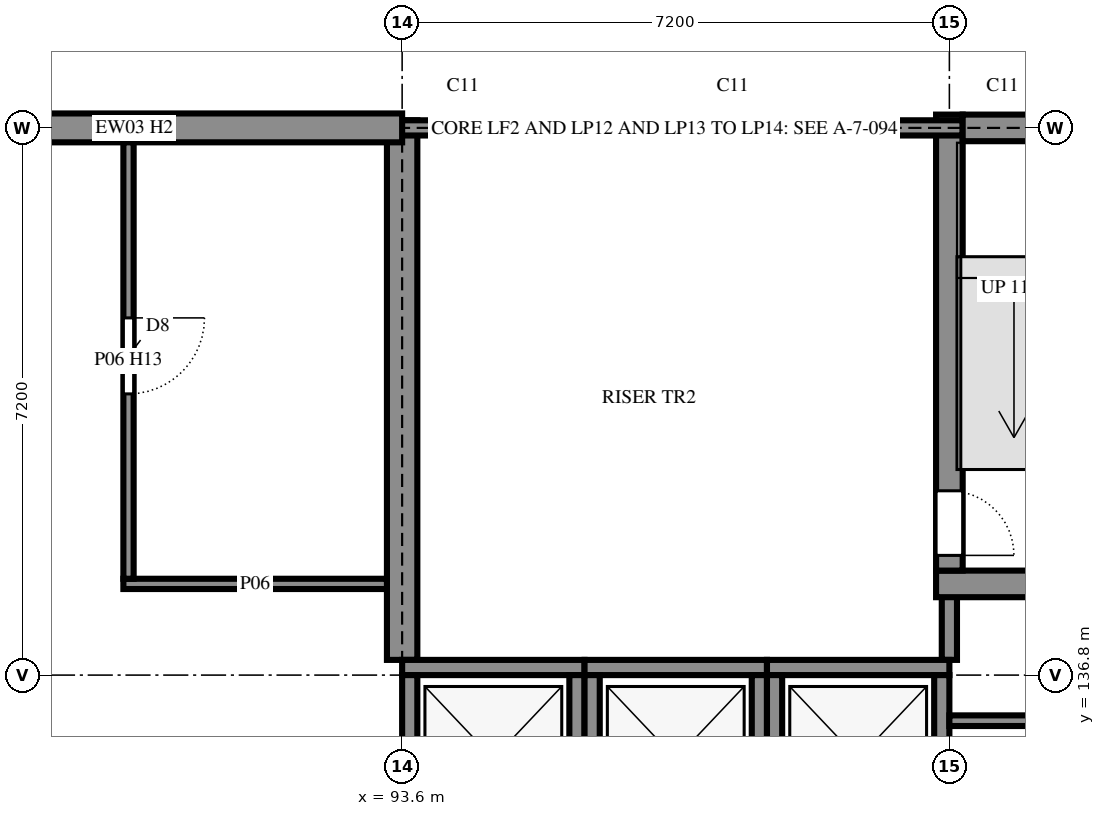
"""IFC4 building model, lengths in metres.
Left out: names, types, materials, properties, quantities, classifications, styles, units other than length and angle.
Written with IfcOpenShell. Run it as: python <this file> out.ifc"""

import sys

from ifc_helpers import new_model, si_unit, direction, frame, frame_2d, origin, origin_2d, place, context, subcontext, project, spatial, rectangle, i_section, extrude, element, fill, save


model = new_model("IFC4")
c1 = context("Model", 3, precision=1e-05, world=origin(), true_north=direction((0.0, 1.0)))
c2 = subcontext(c1, "Body", "Model", "MODEL_VIEW")
j1 = project(units=[si_unit("LENGTHUNIT", "METRE"), si_unit("PLANEANGLEUNIT", "RADIAN")], contexts=[c1])
p1 = place(None, origin())
s1 = spatial("IfcSite", under=j1, at=p1, CompositionType="ELEMENT")
p2 = place(p1, origin())
s2 = spatial("IfcBuilding", under=s1, at=p2, CompositionType="ELEMENT")
p3 = place(p2, frame((0.0, 0.0, 7.2)))
s3 = spatial("IfcBuildingStorey", under=s2, at=p3, CompositionType="ELEMENT", Elevation=7.2)
p4 = place(p3, frame((100.8, 137.0, 0.0), z_axis=(0.0, 0.0, 1.0), x_axis=(0.0, 1.0, 0.0)))
e1 = element("IfcWall", 1, at=p4, inside=s3, PredefinedType="SHEAR", context=c2, shape_type="SweptSolid", body=[
    extrude(rectangle(XDim=1.175, YDim=0.2, at=frame_2d((0.587, 0.0))), origin(), (0.0, 0.0, 1.0), 3.6),
])
p5 = place(p3, frame((100.625, 138.0, 0.0), z_axis=(0.0, 0.0, 1.0), x_axis=(1.0, 0.0, 0.0)))
e2 = element("IfcWall", 2, at=p5, inside=s3, PredefinedType="SHEAR", context=c2, shape_type="SweptSolid", body=[
    extrude(rectangle(XDim=3.75, YDim=0.35, at=frame_2d((1.875, 0.0))), origin(), (0.0, 0.0, 1.0), 3.6),
])
p6 = place(p5, frame((1.375, 0.0, 0.0)))
e3 = element("IfcOpeningElement", 3, at=p6, cuts=e2, PredefinedType="OPENING", context=c2, shape_type="SweptSolid", body=[
    extrude(rectangle(XDim=1.0, YDim=2.1, at=frame_2d((0.5, 1.05))), frame((0.0, 0.185, 0.0), z_axis=(0.0, -1.0, 0.0), x_axis=(1.0, 0.0, 0.0)), (0.0, 0.0, 1.0), 0.37),
])
p7 = place(p3, frame((93.6, 144.1, 0.0), z_axis=(0.0, 0.0, 1.0), x_axis=(0.0, -1.0, 0.0)))
e4 = element("IfcWall", 4, at=p7, inside=s3, PredefinedType="SHEAR", context=c2, shape_type="SweptSolid", body=[
    extrude(rectangle(XDim=7.1, YDim=0.4, at=frame_2d((3.55, 0.0))), origin(), (0.0, 0.0, 1.0), 3.6),
])
p8 = place(p3, frame((100.8, 144.175, 0.0), z_axis=(0.0, 0.0, 1.0), x_axis=(0.0, -1.0, 0.0)))
e5 = element("IfcWall", 5, at=p8, inside=s3, PredefinedType="SHEAR", context=c2, shape_type="SweptSolid", body=[
    extrude(rectangle(XDim=6.0, YDim=0.35, at=frame_2d((3.0, 0.0))), origin(), (0.0, 0.0, 1.0), 3.6),
])
p9 = place(p8, frame((4.95, 0.0, 0.0)))
e6 = element("IfcOpeningElement", 6, at=p9, cuts=e5, PredefinedType="OPENING", context=c2, shape_type="SweptSolid", body=[
    extrude(rectangle(XDim=0.85, YDim=2.1, at=frame_2d((0.425, 1.05))), frame((0.0, 0.185, 0.0), z_axis=(0.0, -1.0, 0.0), x_axis=(1.0, 0.0, 0.0)), (0.0, 0.0, 1.0), 0.37),
])
p10 = place(p3, frame((100.975, 144.0, 0.0), z_axis=(0.0, 0.0, 1.0), x_axis=(-1.0, 0.0, 0.0)))
e7 = element("IfcWall", 7, at=p10, inside=s3, PredefinedType="SHEAR", context=c2, shape_type="SweptSolid", body=[
    extrude(rectangle(XDim=7.575, YDim=0.2, at=frame_2d((3.788, 0.0))), origin(), (0.0, 0.0, 1.0), 3.6),
])
p11 = place(p3, frame((104.2, 144.0, 0.0), z_axis=(0.0, 0.0, 1.0), x_axis=(-1.0, 0.0, 0.0)))
e8 = element("IfcWall", 8, at=p11, inside=s3, PredefinedType="SHEAR", context=c2, shape_type="SweptSolid", body=[
    extrude(rectangle(XDim=3.225, YDim=0.35, at=frame_2d((1.612, 0.0))), origin(), (0.0, 0.0, 1.0), 3.6),
])
p12 = place(p11, frame((1.25, 0.0, 0.6)))
e9 = element("IfcOpeningElement", 9, at=p12, cuts=e8, PredefinedType="OPENING", context=c2, shape_type="SweptSolid", body=[
    extrude(rectangle(XDim=0.9, YDim=2.1, at=frame_2d((0.45, 1.05))), frame((0.0, 0.185, 0.0), z_axis=(0.0, -1.0, 0.0), x_axis=(1.0, 0.0, 0.0)), (0.0, 0.0, 1.0), 0.37),
])
p13 = place(p3, frame((93.6, 144.0, 0.0), z_axis=(0.0, 0.0, 1.0), x_axis=(-1.0, 0.0, 0.0)))
e10 = element("IfcWall", 10, at=p13, inside=s3, PredefinedType="SOLIDWALL", context=c2, shape_type="SweptSolid", body=[
    extrude(rectangle(XDim=7.047, YDim=0.38, at=frame_2d((3.523, 0.0))), origin(), (0.0, 0.0, 1.0), 3.12),
])
p14 = place(p3, frame((93.6, 136.9, 0.0), z_axis=(0.0, 0.0, 1.0), x_axis=(1.0, 0.0, 0.0)))
e11 = element("IfcWall", 11, at=p14, inside=s3, PredefinedType="SHEAR", context=c2, shape_type="SweptSolid", body=[
    extrude(rectangle(XDim=2.4, YDim=0.2, at=frame_2d((1.2, 0.0))), origin(), (0.0, 0.0, 1.0), 3.6),
])
for number, where, z_axis, x_axis in (
    (12, (93.7, 134.6, 0.0), (0.0, 0.0, 1.0), (0.0, 1.0, 0.0)),
    (13, (95.9, 134.6, 0.0), (0.0, 0.0, 1.0), (0.0, 1.0, 0.0)),
):
    element("IfcWall", number, at=place(p3, frame(where, z_axis=z_axis, x_axis=x_axis)), inside=s3, PredefinedType="SHEAR", context=c2, shape_type="SweptSolid", body=[
        extrude(rectangle(XDim=2.2, YDim=0.2, at=frame_2d((1.1, 0.0))), origin(), (0.0, 0.0, 1.0), 3.6),
    ])
p15 = place(p3, frame((96.0, 136.9, 0.0), z_axis=(0.0, 0.0, 1.0), x_axis=(1.0, 0.0, 0.0)))
e14 = element("IfcWall", 14, at=p15, inside=s3, PredefinedType="SHEAR", context=c2, shape_type="SweptSolid", body=[
    extrude(rectangle(XDim=2.4, YDim=0.2, at=frame_2d((1.2, 0.0))), origin(), (0.0, 0.0, 1.0), 3.6),
])
for number, where, z_axis, x_axis in (
    (15, (96.1, 134.6, 0.0), (0.0, 0.0, 1.0), (0.0, 1.0, 0.0)),
    (16, (98.3, 134.6, 0.0), (0.0, 0.0, 1.0), (0.0, 1.0, 0.0)),
):
    element("IfcWall", number, at=place(p3, frame(where, z_axis=z_axis, x_axis=x_axis)), inside=s3, PredefinedType="SHEAR", context=c2, shape_type="SweptSolid", body=[
        extrude(rectangle(XDim=2.2, YDim=0.2, at=frame_2d((1.1, 0.0))), origin(), (0.0, 0.0, 1.0), 3.6),
    ])
p16 = place(p3, frame((98.4, 136.9, 0.0), z_axis=(0.0, 0.0, 1.0), x_axis=(1.0, 0.0, 0.0)))
e17 = element("IfcWall", 17, at=p16, inside=s3, PredefinedType="SHEAR", context=c2, shape_type="SweptSolid", body=[
    extrude(rectangle(XDim=2.4, YDim=0.2, at=frame_2d((1.2, 0.0))), origin(), (0.0, 0.0, 1.0), 3.6),
])
for number, where, z_axis, x_axis in (
    (18, (98.5, 134.6, 0.0), (0.0, 0.0, 1.0), (0.0, 1.0, 0.0)),
    (19, (100.7, 134.6, 0.0), (0.0, 0.0, 1.0), (0.0, 1.0, 0.0)),
):
    element("IfcWall", number, at=place(p3, frame(where, z_axis=z_axis, x_axis=x_axis)), inside=s3, PredefinedType="SHEAR", context=c2, shape_type="SweptSolid", body=[
        extrude(rectangle(XDim=2.2, YDim=0.2, at=frame_2d((1.1, 0.0))), origin(), (0.0, 0.0, 1.0), 3.6),
    ])
for number, where, z_axis, x_axis in (
    (20, (94.4, 144.55, 0.0), (0.0, 0.0, 1.0), (1.0, 0.0, 0.0)),
    (21, (97.95, 144.55, 0.0), (0.0, 0.0, 1.0), (1.0, 0.0, 0.0)),
    (22, (101.5, 144.55, 0.0), (0.0, 0.0, 1.0), (1.0, 0.0, 0.0)),
):
    element("IfcColumn", number, at=place(p3, frame(where, z_axis=z_axis, x_axis=x_axis)), inside=s3, PredefinedType="COLUMN", context=c2, shape_type="SweptSolid", body=[
        extrude(i_section(OverallWidth=0.2, OverallDepth=0.2, WebThickness=0.009, FlangeThickness=0.015, FilletRadius=0.018, at=origin_2d()), origin(), (0.0, 0.0, 1.0), 3.6),
    ])
p17 = place(p3, frame((100.8, 136.2, 0.0), z_axis=(0.0, 0.0, 1.0), x_axis=(1.0, 0.0, 0.0)))
e23 = element("IfcWall", 23, at=p17, inside=s3, PredefinedType="PARTITIONING", context=c2, shape_type="SweptSolid", body=[
    extrude(rectangle(XDim=3.3, YDim=0.14, at=frame_2d((1.65, 0.0))), origin(), (0.0, 0.0, 1.0), 3.42),
])
p18 = place(p17, frame((1.2, 0.0, 0.0)))
e24 = element("IfcOpeningElement", 24, at=p18, cuts=e23, PredefinedType="OPENING", context=c2, shape_type="SweptSolid", body=[
    extrude(rectangle(XDim=1.0, YDim=2.1, at=frame_2d((0.5, 1.05))), frame((0.0, 0.08, 0.0), z_axis=(0.0, -1.0, 0.0), x_axis=(1.0, 0.0, 0.0)), (0.0, 0.0, 1.0), 0.16),
])
p19 = place(p3, frame((89.933, 138.0, 0.0), z_axis=(0.0, 0.0, 1.0), x_axis=(1.0, 0.0, 0.0)))
e25 = element("IfcWall", 25, at=p19, inside=s3, PredefinedType="PARTITIONING", context=c2, shape_type="SweptSolid", body=[
    extrude(rectangle(XDim=3.467, YDim=0.135, at=frame_2d((1.734, 0.0))), origin(), (0.0, 0.0, 1.0), 3.42),
])
p20 = place(p3, frame((90.0, 138.067, 0.0), z_axis=(0.0, 0.0, 1.0), x_axis=(0.0, 1.0, 0.0)))
e26 = element("IfcWall", 26, at=p20, inside=s3, PredefinedType="PARTITIONING", context=c2, shape_type="SweptSolid", body=[
    extrude(rectangle(XDim=5.743, YDim=0.135, at=frame_2d((2.871, 0.0))), origin(), (0.0, 0.0, 1.0), 3.02),
])
p21 = place(p20, frame((2.433, 0.0, 0.0)))
e27 = element("IfcOpeningElement", 27, at=p21, cuts=e26, PredefinedType="OPENING", context=c2, shape_type="SweptSolid", body=[
    extrude(rectangle(XDim=1.0, YDim=2.4, at=frame_2d((0.5, 1.2))), frame((0.0, 0.077, 0.0), z_axis=(0.0, -1.0, 0.0), x_axis=(1.0, 0.0, 0.0)), (0.0, 0.0, 1.0), 0.155),
])
p22 = place(p21, frame((1.0, 0.0, 0.0), z_axis=(0.0, 0.0, 1.0), x_axis=(-1.0, 0.0, 0.0)))
e28 = element("IfcDoor", 28, at=p22, inside=s3, OperationType="SINGLE_SWING_RIGHT", PredefinedType="DOOR", context=c2, shape_type="SweptSolid", body=[
    extrude(rectangle(XDim=1.0, YDim=2.4, at=frame_2d((0.5, 1.2))), frame((0.0, 0.025, 0.0), z_axis=(0.0, -1.0, 0.0), x_axis=(1.0, 0.0, 0.0)), (0.0, 0.0, 1.0), 0.05),
])
fill(e27, e28)
p23 = place(p9, origin())
e29 = element("IfcDoor", 29, at=p23, inside=s3, OperationType="SINGLE_SWING_LEFT", PredefinedType="DOOR", context=c2, shape_type="SweptSolid", body=[
    extrude(rectangle(XDim=0.85, YDim=2.1, at=frame_2d((0.425, 1.05))), frame((0.0, 0.025, 0.0), z_axis=(0.0, -1.0, 0.0), x_axis=(1.0, 0.0, 0.0)), (0.0, 0.0, 1.0), 0.05),
])
fill(e6, e29)
save(model, sys.argv[1])
